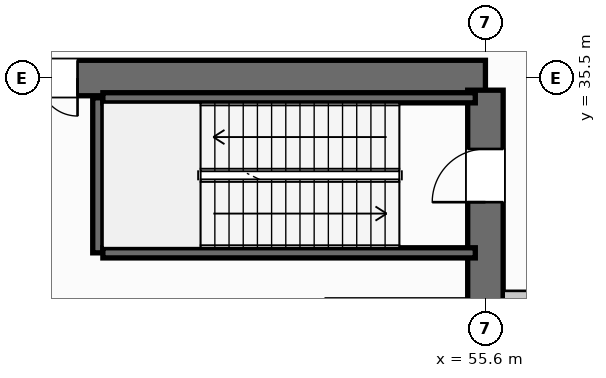
"""IFC4 building model, lengths in metres.
Left out: names, types, materials, properties, quantities, classifications, styles, units other than length and angle.
Written with IfcOpenShell. Run it as: python <this file> out.ifc"""

import sys

from ifc_helpers import new_model, si_unit, direction, frame, frame_2d, origin, place, context, subcontext, project, spatial, rectangle, extrude, source, transform, mapped, element, fill, save


model = new_model("IFC4")
c1 = context("Model", 3, precision=1e-05, world=origin(), true_north=direction((0.0, 1.0)))
c2 = subcontext(c1, "Body", "Model", "MODEL_VIEW")
j1 = project(units=[si_unit("LENGTHUNIT", "METRE"), si_unit("PLANEANGLEUNIT", "RADIAN")], contexts=[c1])
p1 = place(None, origin())
s1 = spatial("IfcSite", under=j1, at=p1, CompositionType="ELEMENT")
p2 = place(p1, origin())
s2 = spatial("IfcBuilding", under=s1, at=p2, CompositionType="ELEMENT")
p3 = place(p2, frame((0.0, 0.0, 80.4)))
s3 = spatial("IfcBuildingStorey", under=s2, at=p3, CompositionType="ELEMENT", Elevation=80.4)
p4 = place(p3, frame((55.6, 35.5, 0.0), z_axis=(0.0, 0.0, 1.0), x_axis=(-1.0, 0.0, 0.0)))
e1 = element("IfcWall", 1, at=p4, inside=s3, PredefinedType="SHEAR", context=c2, shape_type="SweptSolid", body=[
    extrude(rectangle(XDim=17.6, YDim=0.7, at=frame_2d((8.8, 0.0))), origin(), (0.0, 0.0, 1.0), 4.76),
])
p5 = place(p4, frame((8.05, 0.0, 0.0)))
e2 = element("IfcOpeningElement", 2, at=p5, cuts=e1, PredefinedType="OPENING", context=c2, shape_type="SweptSolid", body=[
    extrude(rectangle(XDim=1.5, YDim=2.2, at=frame_2d((0.75, 1.1))), frame((0.0, 0.36, 0.0), z_axis=(0.0, -1.0, 0.0), x_axis=(1.0, 0.0, 0.0)), (0.0, 0.0, 1.0), 0.72),
])
p6 = place(p4, frame((14.95, 0.0, 0.0)))
e3 = element("IfcOpeningElement", 3, at=p6, cuts=e1, PredefinedType="OPENING", context=c2, shape_type="SweptSolid", body=[
    extrude(rectangle(XDim=1.4, YDim=2.3, at=frame_2d((0.7, 1.15))), frame((0.0, 0.36, 0.0), z_axis=(0.0, -1.0, 0.0), x_axis=(1.0, 0.0, 0.0)), (0.0, 0.0, 1.0), 0.72),
])
p7 = place(p4, frame((12.3, 0.0, 0.0)))
e4 = element("IfcOpeningElement", 4, at=p7, cuts=e1, PredefinedType="OPENING", context=c2, shape_type="SweptSolid", body=[
    extrude(rectangle(XDim=0.95, YDim=2.15, at=frame_2d((0.475, 1.075))), frame((0.0, 0.36, 0.0), z_axis=(0.0, -1.0, 0.0), x_axis=(1.0, 0.0, 0.0)), (0.0, 0.0, 1.0), 0.72),
])
p8 = place(p4, frame((10.2, 0.0, 0.0)))
e5 = element("IfcOpeningElement", 5, at=p8, cuts=e1, PredefinedType="OPENING", context=c2, shape_type="SweptSolid", body=[
    extrude(rectangle(XDim=0.9, YDim=2.15, at=frame_2d((0.45, 1.075))), frame((0.0, 0.36, 0.0), z_axis=(0.0, -1.0, 0.0), x_axis=(1.0, 0.0, 0.0)), (0.0, 0.0, 1.0), 0.72),
])
p9 = place(p3, frame((55.6, 20.34, 0.0), z_axis=(0.0, 0.0, 1.0), x_axis=(0.0, 1.0, 0.0)))
e6 = element("IfcWall", 6, at=p9, inside=s3, PredefinedType="SHEAR", context=c2, shape_type="SweptSolid", body=[
    extrude(rectangle(XDim=14.92, YDim=0.7, at=frame_2d((7.46, 0.0))), origin(), (0.0, 0.0, 1.0), 4.76),
])
p10 = place(p9, frame((12.71, 0.0, 0.0)))
e7 = element("IfcOpeningElement", 7, at=p10, cuts=e6, PredefinedType="OPENING", context=c2, shape_type="SweptSolid", body=[
    extrude(rectangle(XDim=1.05, YDim=2.15, at=frame_2d((0.525, 1.075))), frame((0.0, 0.36, 0.0), z_axis=(0.0, -1.0, 0.0), x_axis=(1.0, 0.0, 0.0)), (0.0, 0.0, 1.0), 0.72),
])
p11 = place(p9, frame((8.61, 0.0, 0.0)))
e8 = element("IfcOpeningElement", 8, at=p11, cuts=e6, PredefinedType="OPENING", context=c2, shape_type="SweptSolid", body=[
    extrude(rectangle(XDim=1.1, YDim=2.2, at=frame_2d((0.55, 1.1))), frame((0.0, 0.36, 0.0), z_axis=(0.0, -1.0, 0.0), x_axis=(1.0, 0.0, 0.0)), (0.0, 0.0, 1.0), 0.72),
])
p12 = place(p3, frame((47.95, 32.05, 0.0), z_axis=(0.0, 0.0, 1.0), x_axis=(0.0, 1.0, 0.0)))
e9 = element("IfcWall", 9, at=p12, inside=s3, PredefinedType="SHEAR", context=c2, shape_type="SweptSolid", body=[
    extrude(rectangle(XDim=3.06, YDim=0.2, at=frame_2d((1.53, 0.0))), origin(), (0.0, 0.0, 1.0), 4.76),
])
for number, where, z_axis, x_axis in (
    (10, (48.05, 35.11, 0.0), (0.0, 0.0, 1.0), (1.0, 0.0, 0.0)),
    (11, (55.4, 32.05, 0.0), (0.0, 0.0, 1.0), (-1.0, 0.0, 0.0)),
):
    element("IfcWall", number, at=place(p3, frame(where, z_axis=z_axis, x_axis=x_axis)), inside=s3, PredefinedType="SHEAR", context=c2, shape_type="SweptSolid", body=[
        extrude(rectangle(XDim=7.35, YDim=0.2, at=frame_2d((3.675, 0.0))), origin(), (0.0, 0.0, 1.0), 4.76),
    ])
p13 = place(p3, frame((52.45, 31.05, 0.0), z_axis=(0.0, 0.0, 1.0), x_axis=(1.0, 0.0, 0.0)))
e12 = element("IfcWall", 12, at=p13, inside=s3, PredefinedType="PARTITIONING", context=c2, shape_type="SweptSolid", body=[
    extrude(rectangle(XDim=2.79, YDim=0.2, at=frame_2d((1.395, 0.0))), origin(), (0.0, 0.0, 1.0), 2.335),
])
p14 = place(p3, frame((55.96, 31.2, 0.0), z_axis=(0.0, 0.0, 1.0), x_axis=(1.0, 0.0, 0.0)))
e13 = element("IfcWall", 13, at=p14, inside=s3, PredefinedType="PARTITIONING", context=c2, shape_type="SweptSolid", body=[
    extrude(rectangle(XDim=3.14, YDim=0.2, at=frame_2d((1.57, 0.0))), origin(), (0.0, 0.0, 1.0), 2.335),
])
m1 = source(origin(), c2, "Body", "SweptSolid", [
    extrude(rectangle(XDim=1.05, YDim=2.15, at=frame_2d((0.525, 1.075))), frame((0.0, 0.025, 0.0), z_axis=(0.0, -1.0, 0.0), x_axis=(1.0, 0.0, 0.0)), (0.0, 0.0, 1.0), 0.05),
])
p15 = place(p10, origin())
e14 = element("IfcDoor", 14, at=p15, inside=s3, OperationType="SINGLE_SWING_LEFT", PredefinedType="DOOR", context=c2, shape_type="MappedRepresentation", body=[
    mapped(m1, transform((0.0, 0.0, 0.0), scale=1.0)),
])
fill(e7, e14)
m2 = source(origin(), c2, "Body", "SweptSolid", [
    extrude(rectangle(XDim=1.5, YDim=2.2, at=frame_2d((0.75, 1.1))), frame((0.0, 0.025, 0.0), z_axis=(0.0, -1.0, 0.0), x_axis=(1.0, 0.0, 0.0)), (0.0, 0.0, 1.0), 0.05),
])
p16 = place(p5, origin())
e15 = element("IfcDoor", 15, at=p16, inside=s3, OperationType="DOUBLE_DOOR_SINGLE_SWING", PredefinedType="DOOR", context=c2, shape_type="MappedRepresentation", body=[
    mapped(m2, transform((0.0, 0.0, 0.0), scale=1.0)),
])
fill(e2, e15)
save(model, sys.argv[1])
